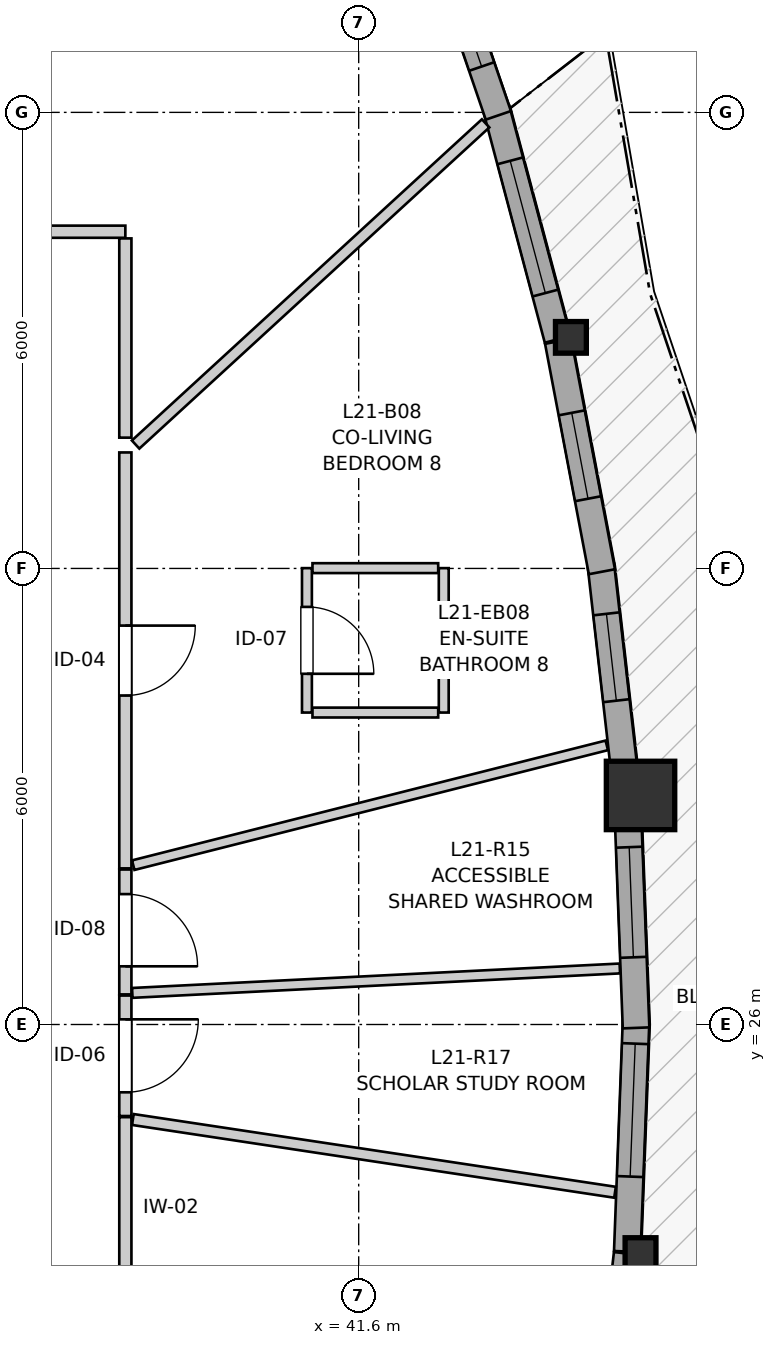
"""IFC4 building model, lengths in metres.
Left out: names, types, materials, properties, quantities, classifications, styles, units other than length and angle.
Written with IfcOpenShell. Run it as: python <this file> out.ifc"""

import sys

from ifc_helpers import new_model, si_unit, direction, frame, frame_2d, origin, origin_2d, place, context, subcontext, project, spatial, rectangle, i_section, extrude, source, transform, mapped, element, fill, save


model = new_model("IFC4")
c1 = context("Model", 3, precision=1e-05, world=origin(), true_north=direction((0.0, 1.0)))
c2 = subcontext(c1, "Body", "Model", "MODEL_VIEW")
j1 = project(units=[si_unit("LENGTHUNIT", "METRE"), si_unit("PLANEANGLEUNIT", "RADIAN")], contexts=[c1])
p1 = place(None, origin())
s1 = spatial("IfcSite", under=j1, at=p1, CompositionType="ELEMENT")
p2 = place(p1, origin())
s2 = spatial("IfcBuilding", under=s1, at=p2, CompositionType="ELEMENT")
p3 = place(p2, frame((0.0, 0.0, 73.6)))
s3 = spatial("IfcBuildingStorey", under=s2, at=p3, CompositionType="ELEMENT", Elevation=73.6)
m1 = source(origin(), c2, "Body", "SweptSolid", [
    extrude(i_section(OverallWidth=0.406, OverallDepth=0.416, WebThickness=0.027, FlangeThickness=0.044, FilletRadius=0.015, at=origin_2d()), origin(), (0.0, 0.0, 1.0), 2.95),
])
p4 = place(p3, frame((45.308, 22.987, 0.0), z_axis=(0.0, 0.0, 1.0), x_axis=(1.0, 0.0, 0.0)))
e1 = element("IfcColumn", 1, at=p4, inside=s3, PredefinedType="PILASTER", context=c2, shape_type="MappedRepresentation", body=[
    mapped(m1, transform((0.0, 0.0, 0.0), x_axis=(1.0, 0.0, 0.0), y_axis=(0.0, 1.0, 0.0), z_axis=(0.0, 0.0, 1.0), scale=1.0)),
])
m2 = source(origin(), c2, "Body", "SweptSolid", [
    extrude(rectangle(XDim=0.9, YDim=0.9, at=origin_2d()), origin(), (0.0, 0.0, 1.0), 2.95),
])
p5 = place(p3, frame((45.308, 29.013, 0.0), z_axis=(0.0, 0.0, 1.0), x_axis=(1.0, 0.0, 0.0)))
e2 = element("IfcColumn", 2, at=p5, inside=s3, PredefinedType="COLUMN", context=c2, shape_type="MappedRepresentation", body=[
    mapped(m2, transform((0.0, 0.0, 0.0), x_axis=(1.0, 0.0, 0.0), y_axis=(0.0, 1.0, 0.0), z_axis=(0.0, 0.0, 1.0), scale=1.0)),
])
p6 = place(p3, frame((44.392, 35.04, 0.0), z_axis=(0.0, 0.0, 1.0), x_axis=(1.0, 0.0, 0.0)))
e3 = element("IfcColumn", 3, at=p6, inside=s3, PredefinedType="PILASTER", context=c2, shape_type="MappedRepresentation", body=[
    mapped(m1, transform((0.0, 0.0, 0.0), x_axis=(1.0, 0.0, 0.0), y_axis=(0.0, 1.0, 0.0), z_axis=(0.0, 0.0, 1.0), scale=1.0)),
])
p7 = place(p3, frame((44.787, 19.955, 0.0), z_axis=(0.0, 0.0, 1.0), x_axis=(0.113232876367, 0.993568475602, 0.0)))
e4 = element("IfcWall", 4, at=p7, inside=s3, PredefinedType="SOLIDWALL", context=c2, shape_type="SweptSolid", body=[
    extrude(rectangle(XDim=3.051, YDim=0.35, at=frame_2d((1.525, 0.0))), origin(), (0.0, 0.0, 1.0), 2.48),
])
p8 = place(p7, frame((1.06, 0.0, 0.82)))
e5 = element("IfcOpeningElement", 5, at=p8, cuts=e4, PredefinedType="OPENING", context=c2, shape_type="SweptSolid", body=[
    extrude(rectangle(XDim=0.95, YDim=1.35, at=frame_2d((0.475, 0.675))), frame((0.0, 0.185, 0.0), z_axis=(0.0, -1.0, 0.0), x_axis=(1.0, 0.0, 0.0)), (0.0, 0.0, 1.0), 0.37),
])
p9 = place(p3, frame((45.134, 23.013, 0.0), z_axis=(0.0, 0.0, 1.0), x_axis=(0.037984969205, 0.999278310639, 0.0)))
e6 = element("IfcWall", 6, at=p9, inside=s3, PredefinedType="SOLIDWALL", context=c2, shape_type="SweptSolid", body=[
    extrude(rectangle(XDim=3.034, YDim=0.35, at=frame_2d((1.517, 0.0))), origin(), (0.0, 0.0, 1.0), 2.48),
])
p10 = place(p9, frame((0.987, 0.0, 0.82)))
e7 = element("IfcOpeningElement", 7, at=p10, cuts=e6, PredefinedType="OPENING", context=c2, shape_type="SweptSolid", body=[
    extrude(rectangle(XDim=1.75, YDim=1.3, at=frame_2d((0.875, 0.65))), frame((0.0, 0.185, 0.0), z_axis=(0.0, -1.0, 0.0), x_axis=(1.0, 0.0, 0.0)), (0.0, 0.0, 1.0), 0.37),
])
p11 = place(p3, frame((45.249, 25.955, 0.0), z_axis=(0.0, 0.0, 1.0), x_axis=(-0.0379756963, 0.999278663082, 0.0)))
e8 = element("IfcWall", 8, at=p11, inside=s3, PredefinedType="SOLIDWALL", context=c2, shape_type="SweptSolid", body=[
    extrude(rectangle(XDim=2.829, YDim=0.35, at=frame_2d((1.414, 0.0))), origin(), (0.0, 0.0, 1.0), 2.48),
])
p12 = place(p11, frame((0.929, 0.0, 0.82)))
e9 = element("IfcOpeningElement", 9, at=p12, cuts=e8, PredefinedType="OPENING", context=c2, shape_type="SweptSolid", body=[
    extrude(rectangle(XDim=1.45, YDim=1.25, at=frame_2d((0.725, 0.625))), frame((0.0, 0.185, 0.0), z_axis=(0.0, -1.0, 0.0), x_axis=(1.0, 0.0, 0.0)), (0.0, 0.0, 1.0), 0.37),
])
p13 = place(p3, frame((45.109, 29.217, 0.0), z_axis=(0.0, 0.0, 1.0), x_axis=(-0.11323690057, 0.993568016972, 0.0)))
e10 = element("IfcWall", 10, at=p13, inside=s3, PredefinedType="SOLIDWALL", context=c2, shape_type="SweptSolid", body=[
    extrude(rectangle(XDim=2.846, YDim=0.35, at=frame_2d((1.423, 0.0))), origin(), (0.0, 0.0, 1.0), 2.48),
])
p14 = place(p13, frame((1.05, 0.0, 0.82)))
e11 = element("IfcOpeningElement", 11, at=p14, cuts=e10, PredefinedType="OPENING", context=c2, shape_type="SweptSolid", body=[
    extrude(rectangle(XDim=1.15, YDim=1.2, at=frame_2d((0.575, 0.6))), frame((0.0, 0.185, 0.0), z_axis=(0.0, -1.0, 0.0), x_axis=(1.0, 0.0, 0.0)), (0.0, 0.0, 1.0), 0.37),
])
p15 = place(p3, frame((44.8, 31.957, 0.0), z_axis=(0.0, 0.0, 1.0), x_axis=(-0.186672102023, 0.982422274954, 0.0)))
e12 = element("IfcWall", 12, at=p15, inside=s3, PredefinedType="SOLIDWALL", context=c2, shape_type="SweptSolid", body=[
    extrude(rectangle(XDim=3.085, YDim=0.35, at=frame_2d((1.542, 0.0))), origin(), (0.0, 0.0, 1.0), 2.48),
])
p16 = place(p15, frame((0.978, 0.0, 0.82)))
e13 = element("IfcOpeningElement", 13, at=p16, cuts=e12, PredefinedType="OPENING", context=c2, shape_type="SweptSolid", body=[
    extrude(rectangle(XDim=1.15, YDim=1.2, at=frame_2d((0.575, 0.6))), frame((0.0, 0.185, 0.0), z_axis=(0.0, -1.0, 0.0), x_axis=(1.0, 0.0, 0.0)), (0.0, 0.0, 1.0), 0.37),
])
p17 = place(p3, frame((44.218, 35.014, 0.0), z_axis=(0.0, 0.0, 1.0), x_axis=(-0.25705209467, 0.96639754792, 0.0)))
e14 = element("IfcWall", 14, at=p17, inside=s3, PredefinedType="SOLIDWALL", context=c2, shape_type="SweptSolid", body=[
    extrude(rectangle(XDim=3.136, YDim=0.35, at=frame_2d((1.568, 0.0))), origin(), (0.0, 0.0, 1.0), 2.48),
])
p18 = place(p17, frame((0.63, 0.0, 0.82)))
e15 = element("IfcOpeningElement", 15, at=p18, cuts=e14, PredefinedType="OPENING", context=c2, shape_type="SweptSolid", body=[
    extrude(rectangle(XDim=1.8, YDim=1.45, at=frame_2d((0.9, 0.725))), frame((0.0, 0.185, 0.0), z_axis=(0.0, -1.0, 0.0), x_axis=(1.0, 0.0, 0.0)), (0.0, 0.0, 1.0), 0.37),
])
p19 = place(p3, frame((43.437, 37.961, 0.0), z_axis=(0.0, 0.0, 1.0), x_axis=(-0.323572555921, 0.946203361363, 0.0)))
e16 = element("IfcWall", 16, at=p19, inside=s3, PredefinedType="SOLIDWALL", context=c2, shape_type="SweptSolid", body=[
    extrude(rectangle(XDim=2.998, YDim=0.35, at=frame_2d((1.499, 0.0))), origin(), (0.0, 0.0, 1.0), 2.48),
])
p20 = place(p19, frame((0.679, 0.0, 0.82)))
e17 = element("IfcOpeningElement", 17, at=p20, cuts=e16, PredefinedType="OPENING", context=c2, shape_type="SweptSolid", body=[
    extrude(rectangle(XDim=1.65, YDim=1.45, at=frame_2d((0.825, 0.725))), frame((0.0, 0.185, 0.0), z_axis=(0.0, -1.0, 0.0), x_axis=(1.0, 0.0, 0.0)), (0.0, 0.0, 1.0), 0.37),
])
p21 = place(p3, frame((38.53, 24.781, 0.0), z_axis=(0.0, 0.0, 1.0), x_axis=(0.0, -1.0, 0.0)))
e18 = element("IfcWall", 18, at=p21, inside=s3, PredefinedType="PARTITIONING", context=c2, shape_type="SweptSolid", body=[
    extrude(rectangle(XDim=7.203, YDim=0.16, at=frame_2d((3.602, 0.0))), origin(), (0.0, 0.0, 1.0), 2.95),
])
p22 = place(p21, frame((3.119, 0.0, 0.0)))
e19 = element("IfcOpeningElement", 19, at=p22, cuts=e18, PredefinedType="OPENING", context=c2, shape_type="SweptSolid", body=[
    extrude(rectangle(XDim=0.96, YDim=2.1, at=frame_2d((0.48, 1.05))), frame((0.0, 0.09, 0.0), z_axis=(0.0, -1.0, 0.0), x_axis=(1.0, 0.0, 0.0)), (0.0, 0.0, 1.0), 0.18),
])
p23 = place(p3, frame((38.53, 33.526, 0.0), z_axis=(0.0, 0.0, 1.0), x_axis=(0.0, -1.0, 0.0)))
e20 = element("IfcWall", 20, at=p23, inside=s3, PredefinedType="PARTITIONING", context=c2, shape_type="SweptSolid", body=[
    extrude(rectangle(XDim=5.472, YDim=0.16, at=frame_2d((2.736, 0.0))), origin(), (0.0, 0.0, 1.0), 2.95),
])
p24 = place(p23, frame((2.278, 0.0, 0.0)))
e21 = element("IfcOpeningElement", 21, at=p24, cuts=e20, PredefinedType="OPENING", context=c2, shape_type="SweptSolid", body=[
    extrude(rectangle(XDim=0.92, YDim=2.1, at=frame_2d((0.46, 1.05))), frame((0.0, 0.09, 0.0), z_axis=(0.0, -1.0, 0.0), x_axis=(1.0, 0.0, 0.0)), (0.0, 0.0, 1.0), 0.18),
])
p25 = place(p3, frame((34.909, 36.43, 0.0), z_axis=(0.0, 0.0, 1.0), x_axis=(1.0, 0.0, 0.0)))
e22 = element("IfcWall", 22, at=p25, inside=s3, PredefinedType="PARTITIONING", context=c2, shape_type="SweptSolid", body=[
    extrude(rectangle(XDim=3.621, YDim=0.16, at=frame_2d((1.811, 0.0))), origin(), (0.0, 0.0, 1.0), 2.588),
])
p26 = place(p25, frame((1.339, 0.0, 0.0)))
e23 = element("IfcOpeningElement", 23, at=p26, cuts=e22, PredefinedType="OPENING", context=c2, shape_type="SweptSolid", body=[
    extrude(rectangle(XDim=0.96, YDim=2.1, at=frame_2d((0.48, 1.05))), frame((0.0, 0.09, 0.0), z_axis=(0.0, -1.0, 0.0), x_axis=(1.0, 0.0, 0.0)), (0.0, 0.0, 1.0), 0.18),
])
p27 = place(p3, frame((40.919, 32.004, 0.0), z_axis=(0.0, 0.0, 1.0), x_axis=(0.0, -1.0, 0.0)))
e24 = element("IfcWall", 24, at=p27, inside=s3, PredefinedType="PARTITIONING", context=c2, shape_type="SweptSolid", body=[
    extrude(rectangle(XDim=1.9, YDim=0.13, at=frame_2d((0.95, 0.0))), origin(), (0.0, 0.0, 1.0), 2.95),
])
p28 = place(p27, frame((0.51, 0.0, 0.0)))
e25 = element("IfcOpeningElement", 25, at=p28, cuts=e24, PredefinedType="OPENING", context=c2, shape_type="SweptSolid", body=[
    extrude(rectangle(XDim=0.88, YDim=2.05, at=frame_2d((0.44, 1.025))), frame((0.0, 0.075, 0.0), z_axis=(0.0, -1.0, 0.0), x_axis=(1.0, 0.0, 0.0)), (0.0, 0.0, 1.0), 0.15),
])
p29 = place(p3, frame((38.53, 28.039, 0.0), z_axis=(0.0, 0.0, 1.0), x_axis=(0.0, -1.0, 0.0)))
e26 = element("IfcWall", 26, at=p29, inside=s3, PredefinedType="PARTITIONING", context=c2, shape_type="SweptSolid", body=[
    extrude(rectangle(XDim=1.643, YDim=0.16, at=frame_2d((0.822, 0.0))), origin(), (0.0, 0.0, 1.0), 2.95),
])
p30 = place(p29, frame((0.323, 0.0, 0.0)))
e27 = element("IfcOpeningElement", 27, at=p30, cuts=e26, PredefinedType="OPENING", context=c2, shape_type="SweptSolid", body=[
    extrude(rectangle(XDim=0.95, YDim=2.1, at=frame_2d((0.475, 1.05))), frame((0.0, 0.09, 0.0), z_axis=(0.0, -1.0, 0.0), x_axis=(1.0, 0.0, 0.0)), (0.0, 0.0, 1.0), 0.18),
])
p31 = place(p3, frame((38.53, 26.381, 0.0), z_axis=(0.0, 0.0, 1.0), x_axis=(0.0, -1.0, 0.0)))
e28 = element("IfcWall", 28, at=p31, inside=s3, PredefinedType="PARTITIONING", context=c2, shape_type="SweptSolid", body=[
    extrude(rectangle(XDim=1.585, YDim=0.16, at=frame_2d((0.792, 0.0))), origin(), (0.0, 0.0, 1.0), 2.95),
])
p32 = place(p31, frame((0.313, 0.0, 0.0)))
e29 = element("IfcOpeningElement", 29, at=p32, cuts=e28, PredefinedType="OPENING", context=c2, shape_type="SweptSolid", body=[
    extrude(rectangle(XDim=0.96, YDim=2.1, at=frame_2d((0.48, 1.05))), frame((0.0, 0.09, 0.0), z_axis=(0.0, -1.0, 0.0), x_axis=(1.0, 0.0, 0.0)), (0.0, 0.0, 1.0), 0.18),
])
p33 = place(p3, frame((34.977, 36.546, 0.0), z_axis=(0.0, 0.0, 1.0), x_axis=(0.40175384449, 0.915747699117, 0.0)))
e30 = element("IfcWall", 30, at=p33, inside=s3, PredefinedType="PARTITIONING", context=c2, shape_type="SweptSolid", body=[
    extrude(rectangle(XDim=10.23, YDim=0.145, at=frame_2d((5.115, 0.0))), origin(), (0.0, 0.0, 1.0), 2.95),
])
p34 = place(p3, frame((38.634, 28.096, 0.0), z_axis=(0.0, 0.0, 1.0), x_axis=(0.969457090906, 0.245260981186, 0.0)))
e31 = element("IfcWall", 31, at=p34, inside=s3, PredefinedType="PARTITIONING", context=c2, shape_type="SweptSolid", body=[
    extrude(rectangle(XDim=6.427, YDim=0.13, at=frame_2d((3.213, 0.0))), origin(), (0.0, 0.0, 1.0), 2.95),
])
p35 = place(p3, frame((38.629, 24.75, 0.0), z_axis=(0.0, 0.0, 1.0), x_axis=(0.988806184902, -0.149205659073, 0.0)))
e32 = element("IfcWall", 32, at=p35, inside=s3, PredefinedType="PARTITIONING", context=c2, shape_type="SweptSolid", body=[
    extrude(rectangle(XDim=6.416, YDim=0.145, at=frame_2d((3.208, 0.0))), origin(), (0.0, 0.0, 1.0), 2.95),
])
p36 = place(p3, frame((38.621, 26.416, 0.0), z_axis=(0.0, 0.0, 1.0), x_axis=(0.998746074583, 0.050062745689, 0.0)))
e33 = element("IfcWall", 33, at=p36, inside=s3, PredefinedType="PARTITIONING", context=c2, shape_type="SweptSolid", body=[
    extrude(rectangle(XDim=6.423, YDim=0.13, at=frame_2d((3.211, 0.0))), origin(), (0.0, 0.0, 1.0), 2.95),
])
p37 = place(p3, frame((38.665, 33.63, 0.0), z_axis=(0.0, 0.0, 1.0), x_axis=(0.736824900837, 0.676083623161, 0.0)))
e34 = element("IfcWall", 34, at=p37, inside=s3, PredefinedType="PARTITIONING", context=c2, shape_type="SweptSolid", body=[
    extrude(rectangle(XDim=6.25, YDim=0.145, at=frame_2d((3.125, 0.0))), origin(), (0.0, 0.0, 1.0), 2.95),
])
p38 = place(p3, frame((38.53, 33.721, 0.0), z_axis=(0.0, 0.0, 1.0), x_axis=(0.0, 1.0, 0.0)))
e35 = element("IfcWall", 35, at=p38, inside=s3, PredefinedType="PARTITIONING", context=c2, shape_type="SweptSolid", body=[
    extrude(rectangle(XDim=2.621, YDim=0.16, at=frame_2d((1.311, 0.0))), origin(), (0.0, 0.0, 1.0), 2.588),
])
p39 = place(p3, frame((42.719, 30.104, 0.0), z_axis=(0.0, 0.0, 1.0), x_axis=(0.0, 1.0, 0.0)))
e36 = element("IfcWall", 36, at=p39, inside=s3, PredefinedType="PARTITIONING", context=c2, shape_type="SweptSolid", body=[
    extrude(rectangle(XDim=1.9, YDim=0.13, at=frame_2d((0.95, 0.0))), origin(), (0.0, 0.0, 1.0), 2.95),
])
for number, where, z_axis, x_axis in (
    (37, (40.992, 32.004, 0.0), (0.0, 0.0, 1.0), (1.0, 0.0, 0.0)),
    (38, (40.992, 30.104, 0.0), (0.0, 0.0, 1.0), (1.0, 0.0, 0.0)),
):
    element("IfcWall", number, at=place(p3, frame(where, z_axis=z_axis, x_axis=x_axis)), inside=s3, PredefinedType="PARTITIONING", context=c2, shape_type="SweptSolid", body=[
        extrude(rectangle(XDim=1.654, YDim=0.13, at=frame_2d((0.827, 0.0))), origin(), (0.0, 0.0, 1.0), 2.95),
    ])
m3 = source(origin(), c2, "Body", "SweptSolid", [
    extrude(rectangle(XDim=1.75, YDim=1.3, at=frame_2d((0.875, 0.65))), frame((0.0, 0.03, 0.0), z_axis=(0.0, -1.0, 0.0), x_axis=(1.0, 0.0, 0.0)), (0.0, 0.0, 1.0), 0.06),
])
p40 = place(p10, origin())
e39 = element("IfcWindow", 39, at=p40, inside=s3, PartitioningType="SINGLE_PANEL", PredefinedType="WINDOW", context=c2, shape_type="MappedRepresentation", body=[
    mapped(m3, transform((0.0, 0.0, 0.0), x_axis=(1.0, 0.0, 0.0), y_axis=(0.0, 1.0, 0.0), z_axis=(0.0, 0.0, 1.0), scale=1.0)),
])
fill(e7, e39)
m4 = source(origin(), c2, "Body", "SweptSolid", [
    extrude(rectangle(XDim=1.45, YDim=1.25, at=frame_2d((0.725, 0.625))), frame((0.0, 0.03, 0.0), z_axis=(0.0, -1.0, 0.0), x_axis=(1.0, 0.0, 0.0)), (0.0, 0.0, 1.0), 0.06),
])
p41 = place(p12, origin())
e40 = element("IfcWindow", 40, at=p41, inside=s3, PartitioningType="SINGLE_PANEL", PredefinedType="WINDOW", context=c2, shape_type="MappedRepresentation", body=[
    mapped(m4, transform((0.0, 0.0, 0.0), x_axis=(1.0, 0.0, 0.0), y_axis=(0.0, 1.0, 0.0), z_axis=(0.0, 0.0, 1.0), scale=1.0)),
])
fill(e9, e40)
m5 = source(origin(), c2, "Body", "SweptSolid", [
    extrude(rectangle(XDim=1.15, YDim=1.2, at=frame_2d((0.575, 0.6))), frame((0.0, 0.03, 0.0), z_axis=(0.0, -1.0, 0.0), x_axis=(1.0, 0.0, 0.0)), (0.0, 0.0, 1.0), 0.06),
])
p42 = place(p14, origin())
e41 = element("IfcWindow", 41, at=p42, inside=s3, PartitioningType="SINGLE_PANEL", PredefinedType="WINDOW", context=c2, shape_type="MappedRepresentation", body=[
    mapped(m5, transform((0.0, 0.0, 0.0), x_axis=(1.0, 0.0, 0.0), y_axis=(0.0, 1.0, 0.0), z_axis=(0.0, 0.0, 1.0), scale=1.0)),
])
fill(e11, e41)
p43 = place(p16, origin())
e42 = element("IfcWindow", 42, at=p43, inside=s3, PartitioningType="SINGLE_PANEL", PredefinedType="WINDOW", context=c2, shape_type="MappedRepresentation", body=[
    mapped(m5, transform((0.0, 0.0, 0.0), x_axis=(1.0, 0.0, 0.0), y_axis=(0.0, 1.0, 0.0), z_axis=(0.0, 0.0, 1.0), scale=1.0)),
])
fill(e13, e42)
m6 = source(origin(), c2, "Body", "SweptSolid", [
    extrude(rectangle(XDim=1.8, YDim=1.45, at=frame_2d((0.9, 0.725))), frame((0.0, 0.03, 0.0), z_axis=(0.0, -1.0, 0.0), x_axis=(1.0, 0.0, 0.0)), (0.0, 0.0, 1.0), 0.06),
])
p44 = place(p18, origin())
e43 = element("IfcWindow", 43, at=p44, inside=s3, PartitioningType="SINGLE_PANEL", PredefinedType="WINDOW", context=c2, shape_type="MappedRepresentation", body=[
    mapped(m6, transform((0.0, 0.0, 0.0), x_axis=(1.0, 0.0, 0.0), y_axis=(0.0, 1.0, 0.0), z_axis=(0.0, 0.0, 1.0), scale=1.0)),
])
fill(e15, e43)
m7 = source(origin(), c2, "Body", "SweptSolid", [
    extrude(rectangle(XDim=1.65, YDim=1.45, at=frame_2d((0.825, 0.725))), frame((0.0, 0.03, 0.0), z_axis=(0.0, -1.0, 0.0), x_axis=(1.0, 0.0, 0.0)), (0.0, 0.0, 1.0), 0.06),
])
p45 = place(p20, origin())
e44 = element("IfcWindow", 44, at=p45, inside=s3, PartitioningType="SINGLE_PANEL", PredefinedType="WINDOW", context=c2, shape_type="MappedRepresentation", body=[
    mapped(m7, transform((0.0, 0.0, 0.0), x_axis=(1.0, 0.0, 0.0), y_axis=(0.0, 1.0, 0.0), z_axis=(0.0, 0.0, 1.0), scale=1.0)),
])
fill(e17, e44)
m8 = source(origin(), c2, "Body", "SweptSolid", [
    extrude(rectangle(XDim=0.92, YDim=2.1, at=frame_2d((0.46, 1.05))), frame((0.0, 0.025, 0.0), z_axis=(0.0, -1.0, 0.0), x_axis=(1.0, 0.0, 0.0)), (0.0, 0.0, 1.0), 0.05),
])
p46 = place(p24, origin())
e45 = element("IfcDoor", 45, at=p46, inside=s3, OperationType="SINGLE_SWING_LEFT", PredefinedType="DOOR", context=c2, shape_type="MappedRepresentation", body=[
    mapped(m8, transform((0.0, 0.0, 0.0), x_axis=(1.0, 0.0, 0.0), y_axis=(0.0, 1.0, 0.0), z_axis=(0.0, 0.0, 1.0), scale=1.0)),
])
fill(e21, e45)
m9 = source(origin(), c2, "Body", "SweptSolid", [
    extrude(rectangle(XDim=0.88, YDim=2.05, at=frame_2d((0.44, 1.025))), frame((0.0, 0.025, 0.0), z_axis=(0.0, -1.0, 0.0), x_axis=(1.0, 0.0, 0.0)), (0.0, 0.0, 1.0), 0.05),
])
p47 = place(p28, origin())
e46 = element("IfcDoor", 46, at=p47, inside=s3, OperationType="SINGLE_SWING_RIGHT", PredefinedType="DOOR", context=c2, shape_type="MappedRepresentation", body=[
    mapped(m9, transform((0.0, 0.0, 0.0), x_axis=(1.0, 0.0, 0.0), y_axis=(0.0, 1.0, 0.0), z_axis=(0.0, 0.0, 1.0), scale=1.0)),
])
fill(e25, e46)
m10 = source(origin(), c2, "Body", "SweptSolid", [
    extrude(rectangle(XDim=0.95, YDim=2.1, at=frame_2d((0.475, 1.05))), frame((0.0, 0.025, 0.0), z_axis=(0.0, -1.0, 0.0), x_axis=(1.0, 0.0, 0.0)), (0.0, 0.0, 1.0), 0.05),
])
p48 = place(p30, origin())
e47 = element("IfcDoor", 47, at=p48, inside=s3, OperationType="SINGLE_SWING_RIGHT", PredefinedType="DOOR", context=c2, shape_type="MappedRepresentation", body=[
    mapped(m10, transform((0.0, 0.0, 0.0), x_axis=(1.0, 0.0, 0.0), y_axis=(0.0, 1.0, 0.0), z_axis=(0.0, 0.0, 1.0), scale=1.0)),
])
fill(e27, e47)
m11 = source(origin(), c2, "Body", "SweptSolid", [
    extrude(rectangle(XDim=0.96, YDim=2.1, at=frame_2d((0.48, 1.05))), frame((0.0, 0.025, 0.0), z_axis=(0.0, -1.0, 0.0), x_axis=(1.0, 0.0, 0.0)), (0.0, 0.0, 1.0), 0.05),
])
p49 = place(p32, origin())
e48 = element("IfcDoor", 48, at=p49, inside=s3, OperationType="SINGLE_SWING_LEFT", PredefinedType="DOOR", context=c2, shape_type="MappedRepresentation", body=[
    mapped(m11, transform((0.0, 0.0, 0.0), x_axis=(1.0, 0.0, 0.0), y_axis=(0.0, 1.0, 0.0), z_axis=(0.0, 0.0, 1.0), scale=1.0)),
])
fill(e29, e48)
save(model, sys.argv[1])
